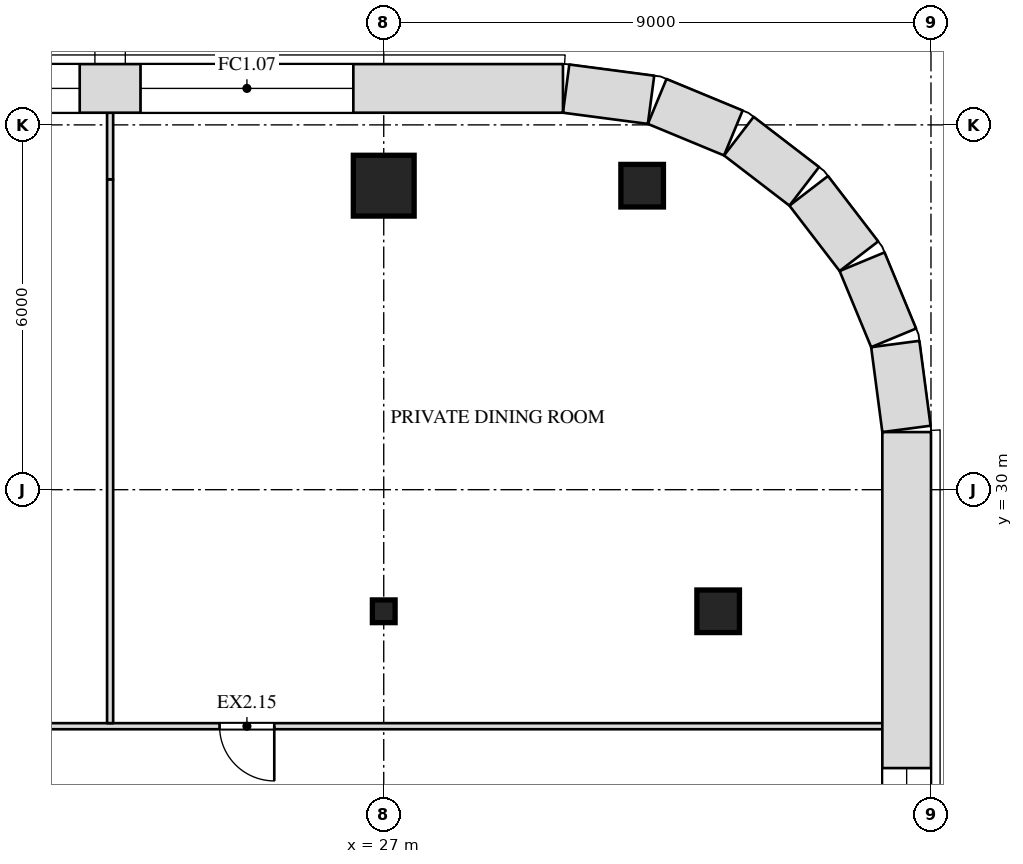
"""IFC4 building model, lengths in metres.
Left out: names, types, materials, properties, quantities, classifications, styles, units other than length and angle.
Written with IfcOpenShell. Run it as: python <this file> out.ifc"""

import sys

from ifc_helpers import new_model, si_unit, direction, frame, frame_2d, origin, origin_2d, place, context, subcontext, project, spatial, rectangle, i_section, extrude, element, fill, save


model = new_model("IFC4")
c1 = context("Model", 3, precision=1e-05, world=origin(), true_north=direction((0.0, 1.0)))
c2 = subcontext(c1, "Body", "Model", "MODEL_VIEW")
j1 = project(units=[si_unit("LENGTHUNIT", "METRE"), si_unit("PLANEANGLEUNIT", "RADIAN")], contexts=[c1])
p1 = place(None, origin())
s1 = spatial("IfcSite", under=j1, at=p1, CompositionType="ELEMENT")
p2 = place(p1, origin())
s2 = spatial("IfcBuilding", under=s1, at=p2, CompositionType="ELEMENT")
p3 = place(p2, frame((0.0, 0.0, 276.5)))
s3 = spatial("IfcBuildingStorey", under=s2, at=p3, CompositionType="ELEMENT", Elevation=276.5)
p4 = place(p3, frame((27.0, 28.0, 0.0), z_axis=(0.0, 0.0, 1.0), x_axis=(1.0, 0.0, 0.0)))
e1 = element("IfcColumn", 1, at=p4, inside=s3, PredefinedType="COLUMN", context=c2, shape_type="SweptSolid", body=[
    extrude(i_section(OverallWidth=0.373, OverallDepth=0.373, WebThickness=0.016, FlangeThickness=0.026, at=origin_2d()), origin(), (0.0, 0.0, 1.0), 4.0),
])
p5 = place(p3, frame((32.5, 28.0, 0.0), z_axis=(0.0, 0.0, 1.0), x_axis=(1.0, 0.0, 0.0)))
e2 = element("IfcColumn", 2, at=p5, inside=s3, PredefinedType="COLUMN", context=c2, shape_type="SweptSolid", body=[
    extrude(rectangle(XDim=0.7, YDim=0.7, at=origin_2d()), origin(), (0.0, 0.0, 1.0), 4.0),
])
p6 = place(p3, frame((27.0, 35.0, 0.0), z_axis=(0.0, 0.0, 1.0), x_axis=(1.0, 0.0, 0.0)))
e3 = element("IfcColumn", 3, at=p6, inside=s3, PredefinedType="COLUMN", context=c2, shape_type="SweptSolid", body=[
    extrude(rectangle(XDim=1.0, YDim=1.0, at=origin_2d()), origin(), (0.0, 0.0, 1.0), 4.0),
])
p7 = place(p3, frame((31.25, 35.0, 0.0), z_axis=(0.0, 0.0, 1.0), x_axis=(1.0, 0.0, 0.0)))
e4 = element("IfcColumn", 4, at=p7, inside=s3, PredefinedType="COLUMN", context=c2, shape_type="SweptSolid", body=[
    extrude(rectangle(XDim=0.7, YDim=0.7, at=origin_2d()), origin(), (0.0, 0.0, 1.0), 4.0),
])
p8 = place(p3, frame((-35.2, 26.11, 0.0), z_axis=(0.0, 0.0, 1.0), x_axis=(1.0, 0.0, 0.0)))
e5 = element("IfcWall", 5, at=p8, inside=s3, PredefinedType="PARTITIONING", context=c2, shape_type="SweptSolid", body=[
    extrude(rectangle(XDim=70.4, YDim=0.1, at=frame_2d((35.2, 0.0))), origin(), (0.0, 0.0, 1.0), 3.78),
])
p9 = place(p8, frame((12.25, 0.0, 0.0)))
e6 = element("IfcOpeningElement", 6, at=p9, cuts=e5, PredefinedType="OPENING", context=c2, shape_type="SweptSolid", body=[
    extrude(rectangle(XDim=0.9, YDim=2.1, at=frame_2d((0.45, 1.05))), frame((0.0, 0.062, 0.0), z_axis=(0.0, -1.0, 0.0), x_axis=(1.0, 0.0, 0.0)), (0.0, 0.0, 1.0), 0.124),
])
p10 = place(p8, frame((21.25, 0.0, 0.0)))
e7 = element("IfcOpeningElement", 7, at=p10, cuts=e5, PredefinedType="OPENING", context=c2, shape_type="SweptSolid", body=[
    extrude(rectangle(XDim=0.9, YDim=2.1, at=frame_2d((0.45, 1.05))), frame((0.0, 0.062, 0.0), z_axis=(0.0, -1.0, 0.0), x_axis=(1.0, 0.0, 0.0)), (0.0, 0.0, 1.0), 0.124),
])
p11 = place(p8, frame((36.55, 0.0, 0.0)))
e8 = element("IfcOpeningElement", 8, at=p11, cuts=e5, PredefinedType="OPENING", context=c2, shape_type="SweptSolid", body=[
    extrude(rectangle(XDim=1.8, YDim=2.1, at=frame_2d((0.9, 1.05))), frame((0.0, 0.062, 0.0), z_axis=(0.0, -1.0, 0.0), x_axis=(1.0, 0.0, 0.0)), (0.0, 0.0, 1.0), 0.124),
])
p12 = place(p8, frame((52.75, 0.0, 0.0)))
e9 = element("IfcOpeningElement", 9, at=p12, cuts=e5, PredefinedType="OPENING", context=c2, shape_type="SweptSolid", body=[
    extrude(rectangle(XDim=0.9, YDim=2.1, at=frame_2d((0.45, 1.05))), frame((0.0, 0.062, 0.0), z_axis=(0.0, -1.0, 0.0), x_axis=(1.0, 0.0, 0.0)), (0.0, 0.0, 1.0), 0.124),
])
p13 = place(p8, frame((59.5, 0.0, 0.0)))
e10 = element("IfcOpeningElement", 10, at=p13, cuts=e5, PredefinedType="OPENING", context=c2, shape_type="SweptSolid", body=[
    extrude(rectangle(XDim=0.9, YDim=2.1, at=frame_2d((0.45, 1.05))), frame((0.0, 0.062, 0.0), z_axis=(0.0, -1.0, 0.0), x_axis=(1.0, 0.0, 0.0)), (0.0, 0.0, 1.0), 0.124),
])
p14 = place(p3, frame((22.5, 26.16, 0.0), z_axis=(0.0, 0.0, 1.0), x_axis=(0.0, 1.0, 0.0)))
e11 = element("IfcWall", 11, at=p14, inside=s3, PredefinedType="PARTITIONING", context=c2, shape_type="SweptSolid", body=[
    extrude(rectangle(XDim=8.945, YDim=0.1, at=frame_2d((4.472, 0.0))), origin(), (0.0, 0.0, 1.0), 3.247),
])
p15 = place(p3, frame((22.5, 35.104, 0.0), z_axis=(0.0, 0.0, 1.0), x_axis=(0.0, 1.0, 0.0)))
e12 = element("IfcWall", 12, at=p15, inside=s3, PredefinedType="PARTITIONING", context=c2, shape_type="SweptSolid", body=[
    extrude(rectangle(XDim=1.095, YDim=0.1, at=frame_2d((0.548, 0.0))), origin(), (0.0, 0.0, 1.0), 3.78),
])
p16 = place(p3, frame((35.6, -7.948, 0.0), z_axis=(0.0, 0.0, 1.0), x_axis=(0.0, 1.0, 0.0)))
e13 = element("IfcWall", 13, at=p16, inside=s3, PredefinedType="SOLIDWALL", context=c2, shape_type="SweptSolid", body=[
    extrude(rectangle(XDim=38.895, YDim=0.8, at=frame_2d((19.448, 0.0))), origin(), (0.0, 0.0, 1.0), 3.78),
])
p17 = place(p16, frame((5.526, 0.0, 1.0)))
e14 = element("IfcOpeningElement", 14, at=p17, cuts=e13, PredefinedType="OPENING", context=c2, shape_type="SweptSolid", body=[
    extrude(rectangle(XDim=3.5, YDim=2.5, at=frame_2d((1.75, 1.25))), frame((0.0, 0.412, 0.0), z_axis=(0.0, -1.0, 0.0), x_axis=(1.0, 0.0, 0.0)), (0.0, 0.0, 1.0), 0.824),
])
p18 = place(p16, frame((10.395, 0.0, 1.0)))
e15 = element("IfcOpeningElement", 15, at=p18, cuts=e13, PredefinedType="OPENING", context=c2, shape_type="SweptSolid", body=[
    extrude(rectangle(XDim=3.5, YDim=2.5, at=frame_2d((1.75, 1.25))), frame((0.0, 0.412, 0.0), z_axis=(0.0, -1.0, 0.0), x_axis=(1.0, 0.0, 0.0)), (0.0, 0.0, 1.0), 0.824),
])
p19 = place(p16, frame((15.263, 0.0, 1.0)))
e16 = element("IfcOpeningElement", 16, at=p19, cuts=e13, PredefinedType="OPENING", context=c2, shape_type="SweptSolid", body=[
    extrude(rectangle(XDim=3.5, YDim=2.5, at=frame_2d((1.75, 1.25))), frame((0.0, 0.412, 0.0), z_axis=(0.0, -1.0, 0.0), x_axis=(1.0, 0.0, 0.0)), (0.0, 0.0, 1.0), 0.824),
])
p20 = place(p16, frame((20.132, 0.0, 1.0)))
e17 = element("IfcOpeningElement", 17, at=p20, cuts=e13, PredefinedType="OPENING", context=c2, shape_type="SweptSolid", body=[
    extrude(rectangle(XDim=3.5, YDim=2.5, at=frame_2d((1.75, 1.25))), frame((0.0, 0.412, 0.0), z_axis=(0.0, -1.0, 0.0), x_axis=(1.0, 0.0, 0.0)), (0.0, 0.0, 1.0), 0.824),
])
p21 = place(p16, frame((25.0, 0.0, 1.0)))
e18 = element("IfcOpeningElement", 18, at=p21, cuts=e13, PredefinedType="OPENING", context=c2, shape_type="SweptSolid", body=[
    extrude(rectangle(XDim=3.5, YDim=2.5, at=frame_2d((1.75, 1.25))), frame((0.0, 0.412, 0.0), z_axis=(0.0, -1.0, 0.0), x_axis=(1.0, 0.0, 0.0)), (0.0, 0.0, 1.0), 0.824),
])
p22 = place(p16, frame((29.869, 0.0, 1.0)))
e19 = element("IfcOpeningElement", 19, at=p22, cuts=e13, PredefinedType="OPENING", context=c2, shape_type="SweptSolid", body=[
    extrude(rectangle(XDim=3.5, YDim=2.5, at=frame_2d((1.75, 1.25))), frame((0.0, 0.412, 0.0), z_axis=(0.0, -1.0, 0.0), x_axis=(1.0, 0.0, 0.0)), (0.0, 0.0, 1.0), 0.824),
])
p23 = place(p3, frame((35.597, 31.0, 0.0), z_axis=(0.0, 0.0, 1.0), x_axis=(-0.130517283865, 0.99144603414, 0.0)))
e20 = element("IfcWall", 20, at=p23, inside=s3, PredefinedType="SOLIDWALL", context=c2, shape_type="SweptSolid", body=[
    extrude(rectangle(XDim=1.408, YDim=0.8, at=frame_2d((0.704, 0.0))), origin(), (0.0, 0.0, 1.0), 3.78),
])
p24 = place(p3, frame((35.386, 32.497, 0.0), z_axis=(0.0, 0.0, 1.0), x_axis=(-0.38276009378, 0.923847774587, 0.0)))
e21 = element("IfcWall", 21, at=p24, inside=s3, PredefinedType="SOLIDWALL", context=c2, shape_type="SweptSolid", body=[
    extrude(rectangle(XDim=1.355, YDim=0.8, at=frame_2d((0.678, 0.0))), origin(), (0.0, 0.0, 1.0), 3.78),
])
for number, where, z_axis, x_axis in (
    (22, (34.815, 33.84, 0.0), (0.0, 0.0, 1.0), (-0.609, 0.793, 0.0)),
    (23, (33.916, 34.989, 0.0), (0.0, 0.0, 1.0), (-0.793, 0.609, 0.0)),
):
    element("IfcWall", number, at=place(p3, frame(where, z_axis=z_axis, x_axis=x_axis)), inside=s3, PredefinedType="SOLIDWALL", context=c2, shape_type="SweptSolid", body=[
        extrude(rectangle(XDim=1.356, YDim=0.8, at=frame_2d((0.678, 0.0))), origin(), (0.0, 0.0, 1.0), 3.78),
    ])
p25 = place(p3, frame((32.75, 35.867, 0.0), z_axis=(0.0, 0.0, 1.0), x_axis=(-0.923847774587, 0.38276009378, 0.0)))
e24 = element("IfcWall", 24, at=p25, inside=s3, PredefinedType="SOLIDWALL", context=c2, shape_type="SweptSolid", body=[
    extrude(rectangle(XDim=1.355, YDim=0.8, at=frame_2d((0.678, 0.0))), origin(), (0.0, 0.0, 1.0), 3.78),
])
p26 = place(p3, frame((31.396, 36.413, 0.0), z_axis=(0.0, 0.0, 1.0), x_axis=(-0.99144603414, 0.130517283865, 0.0)))
e25 = element("IfcWall", 25, at=p26, inside=s3, PredefinedType="SOLIDWALL", context=c2, shape_type="SweptSolid", body=[
    extrude(rectangle(XDim=1.408, YDim=0.8, at=frame_2d((0.704, 0.0))), origin(), (0.0, 0.0, 1.0), 3.78),
])
p27 = place(p3, frame((29.948, 36.6, 0.0), z_axis=(0.0, 0.0, 1.0), x_axis=(-1.0, 0.0, 0.0)))
e26 = element("IfcWall", 26, at=p27, inside=s3, PredefinedType="SOLIDWALL", context=c2, shape_type="SweptSolid", body=[
    extrude(rectangle(XDim=59.895, YDim=0.8, at=frame_2d((29.948, 0.0))), origin(), (0.0, 0.0, 1.0), 3.78),
])
p28 = place(p27, frame((3.448, 0.0, 1.0)))
e27 = element("IfcOpeningElement", 27, at=p28, cuts=e26, PredefinedType="OPENING", context=c2, shape_type="SweptSolid", body=[
    extrude(rectangle(XDim=3.5, YDim=2.5, at=frame_2d((1.75, 1.25))), frame((0.0, 0.412, 0.0), z_axis=(0.0, -1.0, 0.0), x_axis=(1.0, 0.0, 0.0)), (0.0, 0.0, 1.0), 0.824),
])
p29 = place(p27, frame((7.948, 0.0, 1.0)))
e28 = element("IfcOpeningElement", 28, at=p29, cuts=e26, PredefinedType="OPENING", context=c2, shape_type="SweptSolid", body=[
    extrude(rectangle(XDim=3.5, YDim=2.5, at=frame_2d((1.75, 1.25))), frame((0.0, 0.412, 0.0), z_axis=(0.0, -1.0, 0.0), x_axis=(1.0, 0.0, 0.0)), (0.0, 0.0, 1.0), 0.824),
])
p30 = place(p27, frame((12.448, 0.0, 1.0)))
e29 = element("IfcOpeningElement", 29, at=p30, cuts=e26, PredefinedType="OPENING", context=c2, shape_type="SweptSolid", body=[
    extrude(rectangle(XDim=3.5, YDim=2.5, at=frame_2d((1.75, 1.25))), frame((0.0, 0.412, 0.0), z_axis=(0.0, -1.0, 0.0), x_axis=(1.0, 0.0, 0.0)), (0.0, 0.0, 1.0), 0.824),
])
p31 = place(p27, frame((16.948, 0.0, 1.0)))
e30 = element("IfcOpeningElement", 30, at=p31, cuts=e26, PredefinedType="OPENING", context=c2, shape_type="SweptSolid", body=[
    extrude(rectangle(XDim=3.5, YDim=2.5, at=frame_2d((1.75, 1.25))), frame((0.0, 0.412, 0.0), z_axis=(0.0, -1.0, 0.0), x_axis=(1.0, 0.0, 0.0)), (0.0, 0.0, 1.0), 0.824),
])
p32 = place(p27, frame((21.448, 0.0, 1.0)))
e31 = element("IfcOpeningElement", 31, at=p32, cuts=e26, PredefinedType="OPENING", context=c2, shape_type="SweptSolid", body=[
    extrude(rectangle(XDim=3.5, YDim=2.5, at=frame_2d((1.75, 1.25))), frame((0.0, 0.412, 0.0), z_axis=(0.0, -1.0, 0.0), x_axis=(1.0, 0.0, 0.0)), (0.0, 0.0, 1.0), 0.824),
])
p33 = place(p27, frame((25.948, 0.0, 1.0)))
e32 = element("IfcOpeningElement", 32, at=p33, cuts=e26, PredefinedType="OPENING", context=c2, shape_type="SweptSolid", body=[
    extrude(rectangle(XDim=3.5, YDim=2.5, at=frame_2d((1.75, 1.25))), frame((0.0, 0.412, 0.0), z_axis=(0.0, -1.0, 0.0), x_axis=(1.0, 0.0, 0.0)), (0.0, 0.0, 1.0), 0.824),
])
p34 = place(p27, frame((30.448, 0.0, 1.0)))
e33 = element("IfcOpeningElement", 33, at=p34, cuts=e26, PredefinedType="OPENING", context=c2, shape_type="SweptSolid", body=[
    extrude(rectangle(XDim=3.5, YDim=2.5, at=frame_2d((1.75, 1.25))), frame((0.0, 0.412, 0.0), z_axis=(0.0, -1.0, 0.0), x_axis=(1.0, 0.0, 0.0)), (0.0, 0.0, 1.0), 0.824),
])
p35 = place(p27, frame((34.948, 0.0, 1.0)))
e34 = element("IfcOpeningElement", 34, at=p35, cuts=e26, PredefinedType="OPENING", context=c2, shape_type="SweptSolid", body=[
    extrude(rectangle(XDim=3.5, YDim=2.5, at=frame_2d((1.75, 1.25))), frame((0.0, 0.412, 0.0), z_axis=(0.0, -1.0, 0.0), x_axis=(1.0, 0.0, 0.0)), (0.0, 0.0, 1.0), 0.824),
])
p36 = place(p27, frame((39.448, 0.0, 1.0)))
e35 = element("IfcOpeningElement", 35, at=p36, cuts=e26, PredefinedType="OPENING", context=c2, shape_type="SweptSolid", body=[
    extrude(rectangle(XDim=3.5, YDim=2.5, at=frame_2d((1.75, 1.25))), frame((0.0, 0.412, 0.0), z_axis=(0.0, -1.0, 0.0), x_axis=(1.0, 0.0, 0.0)), (0.0, 0.0, 1.0), 0.824),
])
p37 = place(p27, frame((43.948, 0.0, 1.0)))
e36 = element("IfcOpeningElement", 36, at=p37, cuts=e26, PredefinedType="OPENING", context=c2, shape_type="SweptSolid", body=[
    extrude(rectangle(XDim=3.5, YDim=2.5, at=frame_2d((1.75, 1.25))), frame((0.0, 0.412, 0.0), z_axis=(0.0, -1.0, 0.0), x_axis=(1.0, 0.0, 0.0)), (0.0, 0.0, 1.0), 0.824),
])
p38 = place(p27, frame((48.448, 0.0, 1.0)))
e37 = element("IfcOpeningElement", 37, at=p38, cuts=e26, PredefinedType="OPENING", context=c2, shape_type="SweptSolid", body=[
    extrude(rectangle(XDim=3.5, YDim=2.5, at=frame_2d((1.75, 1.25))), frame((0.0, 0.412, 0.0), z_axis=(0.0, -1.0, 0.0), x_axis=(1.0, 0.0, 0.0)), (0.0, 0.0, 1.0), 0.824),
])
p39 = place(p27, frame((52.948, 0.0, 1.0)))
e38 = element("IfcOpeningElement", 38, at=p39, cuts=e26, PredefinedType="OPENING", context=c2, shape_type="SweptSolid", body=[
    extrude(rectangle(XDim=3.5, YDim=2.5, at=frame_2d((1.75, 1.25))), frame((0.0, 0.412, 0.0), z_axis=(0.0, -1.0, 0.0), x_axis=(1.0, 0.0, 0.0)), (0.0, 0.0, 1.0), 0.824),
])
p40 = place(p13, origin())
e39 = element("IfcDoor", 39, at=p40, inside=s3, OperationType="SINGLE_SWING_LEFT", PredefinedType="DOOR", context=c2, shape_type="SweptSolid", body=[
    extrude(rectangle(XDim=0.9, YDim=2.1, at=frame_2d((0.45, 1.05))), frame((0.0, 0.025, 0.0), z_axis=(0.0, -1.0, 0.0), x_axis=(1.0, 0.0, 0.0)), (0.0, 0.0, 1.0), 0.05),
])
fill(e10, e39)
p41 = place(p22, origin())
e40 = element("IfcWindow", 40, at=p41, inside=s3, PartitioningType="SINGLE_PANEL", PredefinedType="WINDOW", context=c2, shape_type="SweptSolid", body=[
    extrude(rectangle(XDim=3.5, YDim=2.5, at=frame_2d((1.75, 1.25))), frame((0.0, 0.03, 0.0), z_axis=(0.0, -1.0, 0.0), x_axis=(1.0, 0.0, 0.0)), (0.0, 0.0, 1.0), 0.06),
])
fill(e19, e40)
p42 = place(p28, origin())
e41 = element("IfcWindow", 41, at=p42, inside=s3, PartitioningType="SINGLE_PANEL", PredefinedType="WINDOW", context=c2, shape_type="SweptSolid", body=[
    extrude(rectangle(XDim=3.5, YDim=2.5, at=frame_2d((1.75, 1.25))), frame((0.0, 0.03, 0.0), z_axis=(0.0, -1.0, 0.0), x_axis=(1.0, 0.0, 0.0)), (0.0, 0.0, 1.0), 0.06),
])
fill(e27, e41)
p43 = place(p29, origin())
e42 = element("IfcWindow", 42, at=p43, inside=s3, PartitioningType="SINGLE_PANEL", PredefinedType="WINDOW", context=c2, shape_type="SweptSolid", body=[
    extrude(rectangle(XDim=3.5, YDim=2.5, at=frame_2d((1.75, 1.25))), frame((0.0, 0.03, 0.0), z_axis=(0.0, -1.0, 0.0), x_axis=(1.0, 0.0, 0.0)), (0.0, 0.0, 1.0), 0.06),
])
fill(e28, e42)
save(model, sys.argv[1])
